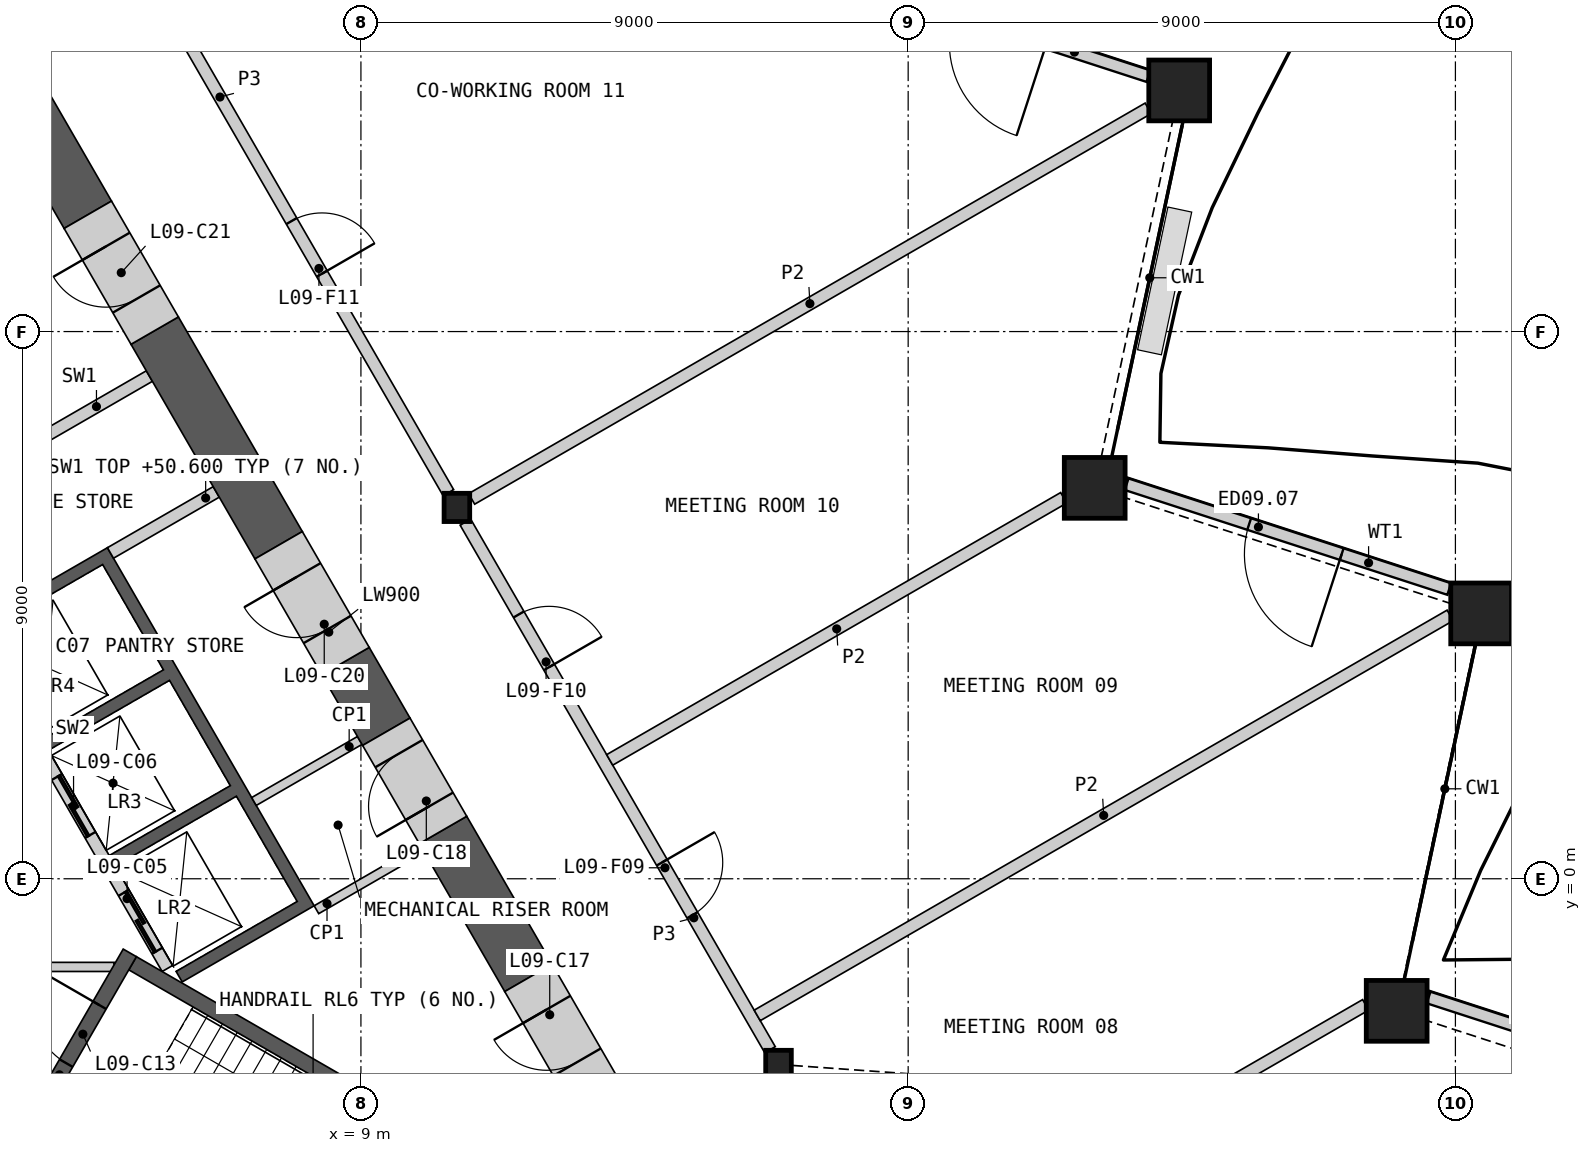
"""IFC4 building model, lengths in metres.
Left out: names, types, materials, properties, quantities, classifications, styles, units other than length and angle.
Written with IfcOpenShell. Run it as: python <this file> out.ifc"""

import sys

from ifc_helpers import new_model, si_unit, direction, frame, frame_2d, origin, origin_2d, place, context, subcontext, project, spatial, polyline, rectangle, hollow_rectangle, i_section, outline, extrude, element, fill, save


model = new_model("IFC4")
c1 = context("Model", 3, precision=1e-05, world=origin(), true_north=direction((0.0, 1.0)))
c2 = subcontext(c1, "Body", "Model", "MODEL_VIEW")
j1 = project(units=[si_unit("LENGTHUNIT", "METRE"), si_unit("PLANEANGLEUNIT", "RADIAN")], contexts=[c1])
p1 = place(None, origin())
s1 = spatial("IfcSite", under=j1, at=p1, CompositionType="ELEMENT")
p2 = place(p1, origin())
s2 = spatial("IfcBuilding", under=s1, at=p2, CompositionType="ELEMENT")
p3 = place(p2, frame((0.0, 0.0, 46.8)))
s3 = spatial("IfcBuildingStorey", under=s2, at=p3, CompositionType="ELEMENT", Elevation=46.8)
for number, where, z_axis, x_axis in (
    (1, (26.034, -2.172, 0.0), (0.0, 0.0, 1.0), (1.0, 0.0, 0.0)),
    (2, (27.423, 4.364, 0.0), (0.0, 0.0, 1.0), (1.0, 0.0, 0.0)),
    (3, (21.068, 6.429, 0.0), (0.0, 0.0, 1.0), (1.0, 0.0, 0.0)),
    (4, (22.457, 12.966, 0.0), (0.0, 0.0, 1.0), (1.0, 0.0, 0.0)),
):
    element("IfcColumn", number, at=place(p3, frame(where, z_axis=z_axis, x_axis=x_axis)), inside=s3, PredefinedType="COLUMN", context=c2, shape_type="SweptSolid", body=[
        extrude(hollow_rectangle(XDim=1.0, YDim=1.0, WallThickness=0.07, at=origin_2d()), origin(), (0.0, 0.0, 1.0), 4.2),
    ])
for number, where, z_axis, x_axis in (
    (5, (15.868, -3.054, 0.0), (0.0, 0.0, 1.0), (1.0, 0.0, 0.0)),
    (6, (10.578, 6.107, 0.0), (0.0, 0.0, 1.0), (1.0, 0.0, 0.0)),
):
    element("IfcColumn", number, at=place(p3, frame(where, z_axis=z_axis, x_axis=x_axis)), inside=s3, PredefinedType="COLUMN", context=c2, shape_type="SweptSolid", body=[
        extrude(i_section(OverallWidth=0.421, OverallDepth=0.465, WebThickness=0.045, FlangeThickness=0.072, at=origin_2d()), origin(), (0.0, 0.0, 1.0), 4.2),
    ])
p4 = place(p3, frame((31.914, -3.693, 0.0), z_axis=(0.0, 0.0, 1.0), x_axis=(-0.951049360908, 0.309039015525, 0.0)))
e7 = element("IfcWall", 7, at=p4, inside=s3, PredefinedType="SOLIDWALL", context=c2, shape_type="SweptSolid", body=[
    extrude(rectangle(XDim=5.631, YDim=0.2, at=frame_2d((2.815, 0.0))), origin(), (0.0, 0.0, 1.0), 3.189),
])
p5 = place(p4, frame((2.031, 0.0, 0.0)))
e8 = element("IfcOpeningElement", 8, at=p5, cuts=e7, PredefinedType="OPENING", context=c2, shape_type="SweptSolid", body=[
    extrude(rectangle(XDim=1.6, YDim=2.4, at=frame_2d((0.8, 1.2))), frame((0.0, 0.11, 0.0), z_axis=(0.0, -1.0, 0.0), x_axis=(1.0, 0.0, 0.0)), (0.0, 0.0, 1.0), 0.22),
])
p6 = place(p3, frame((26.899, 4.765, 0.0), z_axis=(0.0, 0.0, 1.0), x_axis=(-0.951054004345, 0.309024725255, 0.0)))
e9 = element("IfcWall", 9, at=p6, inside=s3, PredefinedType="SOLIDWALL", context=c2, shape_type="SweptSolid", body=[
    extrude(rectangle(XDim=5.579, YDim=0.2, at=frame_2d((2.79, 0.0))), origin(), (0.0, 0.0, 1.0), 3.189),
])
p7 = place(p6, frame((1.86, 0.0, 0.0)))
e10 = element("IfcOpeningElement", 10, at=p7, cuts=e9, PredefinedType="OPENING", context=c2, shape_type="SweptSolid", body=[
    extrude(rectangle(XDim=1.6, YDim=2.4, at=frame_2d((0.8, 1.2))), frame((0.0, 0.11, 0.0), z_axis=(0.0, -1.0, 0.0), x_axis=(1.0, 0.0, 0.0)), (0.0, 0.0, 1.0), 0.22),
])
p8 = place(p3, frame((21.953, 13.2, 0.0), z_axis=(0.0, 0.0, 1.0), x_axis=(-0.951052624268, 0.309028972547, 0.0)))
e11 = element("IfcWall", 11, at=p8, inside=s3, PredefinedType="SOLIDWALL", context=c2, shape_type="SweptSolid", body=[
    extrude(rectangle(XDim=5.124, YDim=0.2, at=frame_2d((2.562, 0.0))), origin(), (0.0, 0.0, 1.0), 3.189),
])
p9 = place(p8, frame((1.762, 0.0, 0.0)))
e12 = element("IfcOpeningElement", 12, at=p9, cuts=e11, PredefinedType="OPENING", context=c2, shape_type="SweptSolid", body=[
    extrude(rectangle(XDim=1.6, YDim=2.4, at=frame_2d((0.8, 1.2))), frame((0.0, 0.11, 0.0), z_axis=(0.0, -1.0, 0.0), x_axis=(1.0, 0.0, 0.0)), (0.0, 0.0, 1.0), 0.22),
])
p10 = place(p3, origin())
e13 = element("IfcWall", 13, at=p10, inside=s3, PredefinedType="SHEAR", context=c2, shape_type="SweptSolid", body=[
    extrude(outline(polyline([(2.66, 4.192), (4.831, 5.445), (8.231, -0.444), (6.061, -1.697), (5.96, -1.524), (7.952, -0.374), (6.952, 1.358), (4.96, 0.208), (4.861, 0.381), (6.852, 1.531), (5.852, 3.263), (3.861, 2.113), (3.76, 2.287), (5.752, 3.437), (4.752, 5.169), (2.76, 4.019), (2.66, 4.192)])), origin(), (0.0, 0.0, 1.0), 3.8),
])
p11 = place(p3, frame((5.817, -1.476, 0.0), z_axis=(0.0, 0.0, 1.0), x_axis=(-0.500002616675, 0.866023893041, 0.0)))
e14 = element("IfcWall", 14, at=p11, inside=s3, PredefinedType="SOLIDWALL", context=c2, shape_type="SweptSolid", body=[
    extrude(rectangle(XDim=8.373, YDim=0.2, at=frame_2d((4.187, 0.0))), origin(), (0.0, 0.0, 1.0), 3.8),
])
p12 = place(p11, frame((0.337, 0.0, 0.0)))
e15 = element("IfcOpeningElement", 15, at=p12, cuts=e14, PredefinedType="OPENING", context=c2, shape_type="SweptSolid", body=[
    extrude(rectangle(XDim=1.1, YDim=2.1, at=frame_2d((0.55, 1.05))), frame((0.0, 0.11, 0.0), z_axis=(0.0, -1.0, 0.0), x_axis=(1.0, 0.0, 0.0)), (0.0, 0.0, 1.0), 0.22),
])
p13 = place(p11, frame((2.537, 0.0, 0.0)))
e16 = element("IfcOpeningElement", 16, at=p13, cuts=e14, PredefinedType="OPENING", context=c2, shape_type="SweptSolid", body=[
    extrude(rectangle(XDim=1.1, YDim=2.1, at=frame_2d((0.55, 1.05))), frame((0.0, 0.11, 0.0), z_axis=(0.0, -1.0, 0.0), x_axis=(1.0, 0.0, 0.0)), (0.0, 0.0, 1.0), 0.22),
])
p14 = place(p11, frame((4.737, 0.0, 0.0)))
e17 = element("IfcOpeningElement", 17, at=p14, cuts=e14, PredefinedType="OPENING", context=c2, shape_type="SweptSolid", body=[
    extrude(rectangle(XDim=1.1, YDim=2.1, at=frame_2d((0.55, 1.05))), frame((0.0, 0.11, 0.0), z_axis=(0.0, -1.0, 0.0), x_axis=(1.0, 0.0, 0.0)), (0.0, 0.0, 1.0), 0.22),
])
p15 = place(p11, frame((7.037, 0.0, 0.0)))
e18 = element("IfcOpeningElement", 18, at=p15, cuts=e14, PredefinedType="OPENING", context=c2, shape_type="SweptSolid", body=[
    extrude(rectangle(XDim=0.9, YDim=2.1, at=frame_2d((0.45, 1.05))), frame((0.0, 0.11, 0.0), z_axis=(0.0, -1.0, 0.0), x_axis=(1.0, 0.0, 0.0)), (0.0, 0.0, 1.0), 0.22),
])
p16 = place(p3, frame((4.881, 5.358, 0.0), z_axis=(0.0, 0.0, 1.0), x_axis=(0.866035824272, 0.499981950752, 0.0)))
e19 = element("IfcWall", 19, at=p16, inside=s3, PredefinedType="SHEAR", context=c2, shape_type="SweptSolid", body=[
    extrude(rectangle(XDim=2.009, YDim=0.2, at=frame_2d((1.004, 0.0))), origin(), (0.0, 0.0, 1.0), 3.8),
])
p17 = place(p3, frame((3.781, 7.263, 0.0), z_axis=(0.0, 0.0, 1.0), x_axis=(0.865983199114, 0.50007309351, 0.0)))
e20 = element("IfcWall", 20, at=p17, inside=s3, PredefinedType="SHEAR", context=c2, shape_type="SweptSolid", body=[
    extrude(rectangle(XDim=2.009, YDim=0.2, at=frame_2d((1.004, 0.0))), origin(), (0.0, 0.0, 1.0), 3.8),
])
p18 = place(p3, frame((-4.941, -1.45, 0.0), z_axis=(0.0, 0.0, 1.0), x_axis=(1.0, 0.0, 0.0)))
e21 = element("IfcWall", 21, at=p18, inside=s3, PredefinedType="PARTITIONING", context=c2, shape_type="SweptSolid", body=[
    extrude(rectangle(XDim=9.882, YDim=0.15, at=frame_2d((4.941, 0.0))), origin(), (0.0, 0.0, 1.0), 3.8),
])
p19 = place(p18, frame((4.391, 0.0, 0.0)))
e22 = element("IfcOpeningElement", 22, at=p19, cuts=e21, PredefinedType="OPENING", context=c2, shape_type="SweptSolid", body=[
    extrude(rectangle(XDim=1.1, YDim=2.1, at=frame_2d((0.55, 1.05))), frame((0.0, 0.085, 0.0), z_axis=(0.0, -1.0, 0.0), x_axis=(1.0, 0.0, 0.0)), (0.0, 0.0, 1.0), 0.17),
])
p20 = place(p3, origin())
e23 = element("IfcWall", 23, at=p20, inside=s3, PredefinedType="SHEAR", context=c2, shape_type="SweptSolid", body=[
    extrude(outline(polyline([(10.032, -4.298), (10.374, -4.206), (5.307, -1.281), (5.182, -1.498), (10.032, -4.298)])), origin(), (0.0, 0.0, 1.0), 3.8),
])
p21 = place(p3, frame((3.655, -3.893, 0.0), z_axis=(0.0, 0.0, 1.0), x_axis=(0.499982516597, 0.866035497597, 0.0)))
e24 = element("IfcWall", 24, at=p21, inside=s3, PredefinedType="SHEAR", context=c2, shape_type="SweptSolid", body=[
    extrude(rectangle(XDim=3.088, YDim=0.25, at=frame_2d((1.544, 0.0))), origin(), (0.0, 0.0, 1.0), 3.8),
])
p22 = place(p21, frame((0.994, 0.0, 0.0)))
e25 = element("IfcOpeningElement", 25, at=p22, cuts=e24, PredefinedType="OPENING", context=c2, shape_type="SweptSolid", body=[
    extrude(rectangle(XDim=1.1, YDim=2.1, at=frame_2d((0.55, 1.05))), frame((0.0, 0.135, 0.0), z_axis=(0.0, -1.0, 0.0), x_axis=(1.0, 0.0, 0.0)), (0.0, 0.0, 1.0), 0.27),
])
p23 = place(p3, frame((8.268, -0.509, 0.0), z_axis=(0.0, 0.0, 1.0), x_axis=(0.866035824272, 0.499981950752, 0.0)))
e26 = element("IfcWall", 26, at=p23, inside=s3, PredefinedType="PARTITIONING", context=c2, shape_type="SweptSolid", body=[
    extrude(rectangle(XDim=2.009, YDim=0.15, at=frame_2d((1.004, 0.0))), origin(), (0.0, 0.0, 1.0), 3.8),
])
p24 = place(p3, frame((8.981, 2.275, 0.0), z_axis=(0.0, 0.0, 1.0), x_axis=(-0.866013584312, -0.500020471368, 0.0)))
e27 = element("IfcWall", 27, at=p24, inside=s3, PredefinedType="PARTITIONING", context=c2, shape_type="SweptSolid", body=[
    extrude(rectangle(XDim=2.009, YDim=0.15, at=frame_2d((1.005, 0.0))), origin(), (0.0, 0.0, 1.0), 3.8),
])
p25 = place(p3, frame((7.646, 5.486, 0.0), z_axis=(0.0, 0.0, 1.0), x_axis=(-0.499978218965, 0.866037978706, 0.0)))
e28 = element("IfcWall", 28, at=p25, inside=s3, PredefinedType="SHEAR", context=c2, shape_type="SweptSolid", body=[
    extrude(rectangle(XDim=4.076, YDim=0.9, at=frame_2d((2.038, 0.0))), origin(), (0.0, 0.0, 1.0), 3.8),
])
p26 = place(p3, frame((4.509, 10.921, 0.0), z_axis=(0.0, 0.0, 1.0), x_axis=(-0.49999004381, 0.866031151917, 0.0)))
e29 = element("IfcWall", 29, at=p26, inside=s3, PredefinedType="SHEAR", context=c2, shape_type="SweptSolid", body=[
    extrude(rectangle(XDim=3.975, YDim=0.9, at=frame_2d((1.988, 0.0))), origin(), (0.0, 0.0, 1.0), 3.8),
])
p27 = place(p3, frame((11.755, -1.63, 0.0), z_axis=(0.0, 0.0, 1.0), x_axis=(-0.499943114462, 0.866058244174, 0.0)))
e30 = element("IfcWall", 30, at=p27, inside=s3, PredefinedType="SHEAR", context=c2, shape_type="SweptSolid", body=[
    extrude(rectangle(XDim=2.809, YDim=0.9, at=frame_2d((1.405, 0.0))), origin(), (0.0, 0.0, 1.0), 3.8),
])
p28 = place(p3, frame((9.418, 2.418, 0.0), z_axis=(0.0, 0.0, 1.0), x_axis=(-0.49995335277, 0.8660523339, 0.0)))
e31 = element("IfcWall", 31, at=p28, inside=s3, PredefinedType="SHEAR", context=c2, shape_type="SweptSolid", body=[
    extrude(rectangle(XDim=1.343, YDim=0.9, at=frame_2d((0.671, 0.0))), origin(), (0.0, 0.0, 1.0), 3.8),
])
p29 = place(p3, frame((12.855, -3.536, 0.0), z_axis=(0.0, 0.0, 1.0), x_axis=(-0.50002983664, 0.866008176907, 0.0)))
e32 = element("IfcWall", 32, at=p29, inside=s3, PredefinedType="SHEAR", context=c2, shape_type="SweptSolid", body=[
    extrude(rectangle(XDim=2.2, YDim=0.9, at=frame_2d((1.1, 0.0))), origin(), (0.0, 0.0, 1.0), 3.8),
])
p30 = place(p29, frame((0.6, 0.0, 0.0)))
e33 = element("IfcOpeningElement", 33, at=p30, cuts=e32, PredefinedType="OPENING", context=c2, shape_type="SweptSolid", body=[
    extrude(rectangle(XDim=1.0, YDim=2.1, at=frame_2d((0.5, 1.05))), frame((0.0, 0.46, 0.0), z_axis=(0.0, -1.0, 0.0), x_axis=(1.0, 0.0, 0.0)), (0.0, 0.0, 1.0), 0.92),
])
p31 = place(p3, frame((10.35, 0.803, 0.0), z_axis=(0.0, 0.0, 1.0), x_axis=(-0.500081290722, 0.865978465477, 0.0)))
e34 = element("IfcWall", 34, at=p31, inside=s3, PredefinedType="SHEAR", context=c2, shape_type="SweptSolid", body=[
    extrude(rectangle(XDim=1.865, YDim=0.9, at=frame_2d((0.933, 0.0))), origin(), (0.0, 0.0, 1.0), 3.8),
])
p32 = place(p31, frame((0.45, 0.0, 0.0)))
e35 = element("IfcOpeningElement", 35, at=p32, cuts=e34, PredefinedType="OPENING", context=c2, shape_type="SweptSolid", body=[
    extrude(rectangle(XDim=1.0, YDim=2.1, at=frame_2d((0.5, 1.05))), frame((0.0, 0.46, 0.0), z_axis=(0.0, -1.0, 0.0), x_axis=(1.0, 0.0, 0.0)), (0.0, 0.0, 1.0), 0.92),
])
p33 = place(p3, frame((8.747, 3.58, 0.0), z_axis=(0.0, 0.0, 1.0), x_axis=(-0.50002983664, 0.866008176907, 0.0)))
e36 = element("IfcWall", 36, at=p33, inside=s3, PredefinedType="SHEAR", context=c2, shape_type="SweptSolid", body=[
    extrude(rectangle(XDim=2.2, YDim=0.9, at=frame_2d((1.1, 0.0))), origin(), (0.0, 0.0, 1.0), 3.8),
])
p34 = place(p33, frame((0.6, 0.0, 0.0)))
e37 = element("IfcOpeningElement", 37, at=p34, cuts=e36, PredefinedType="OPENING", context=c2, shape_type="SweptSolid", body=[
    extrude(rectangle(XDim=1.0, YDim=2.1, at=frame_2d((0.5, 1.05))), frame((0.0, 0.46, 0.0), z_axis=(0.0, -1.0, 0.0), x_axis=(1.0, 0.0, 0.0)), (0.0, 0.0, 1.0), 0.92),
])
p35 = place(p3, frame((5.608, 9.016, 0.0), z_axis=(0.0, 0.0, 1.0), x_axis=(-0.499994660107, 0.866028486751, 0.0)))
e38 = element("IfcWall", 38, at=p35, inside=s3, PredefinedType="SHEAR", context=c2, shape_type="SweptSolid", body=[
    extrude(rectangle(XDim=2.2, YDim=0.9, at=frame_2d((1.1, 0.0))), origin(), (0.0, 0.0, 1.0), 3.8),
])
p36 = place(p35, frame((0.6, 0.0, 0.0)))
e39 = element("IfcOpeningElement", 39, at=p36, cuts=e38, PredefinedType="OPENING", context=c2, shape_type="SweptSolid", body=[
    extrude(rectangle(XDim=1.0, YDim=2.1, at=frame_2d((0.5, 1.05))), frame((0.0, 0.46, 0.0), z_axis=(0.0, -1.0, 0.0), x_axis=(1.0, 0.0, 0.0)), (0.0, 0.0, 1.0), 0.92),
])
p37 = place(p3, frame((10.719, 5.865, 0.0), z_axis=(0.0, 0.0, 1.0), x_axis=(0.49999175339, -0.866030164915, 0.0)))
e40 = element("IfcWall", 40, at=p37, inside=s3, PredefinedType="PARTITIONING", context=c2, shape_type="SweptSolid", body=[
    extrude(rectangle(XDim=10.019, YDim=0.2, at=frame_2d((5.009, 0.0))), origin(), (0.0, 0.0, 1.0), 3.8),
])
p38 = place(p37, frame((6.464, 0.0, 0.0)))
e41 = element("IfcOpeningElement", 41, at=p38, cuts=e40, PredefinedType="OPENING", context=c2, shape_type="SweptSolid", body=[
    extrude(rectangle(XDim=1.0, YDim=2.1, at=frame_2d((0.5, 1.05))), frame((0.0, 0.11, 0.0), z_axis=(0.0, -1.0, 0.0), x_axis=(1.0, 0.0, 0.0)), (0.0, 0.0, 1.0), 0.22),
])
p39 = place(p37, frame((1.753, 0.0, 0.0)))
e42 = element("IfcOpeningElement", 42, at=p39, cuts=e40, PredefinedType="OPENING", context=c2, shape_type="SweptSolid", body=[
    extrude(rectangle(XDim=1.0, YDim=2.1, at=frame_2d((0.5, 1.05))), frame((0.0, 0.11, 0.0), z_axis=(0.0, -1.0, 0.0), x_axis=(1.0, 0.0, 0.0)), (0.0, 0.0, 1.0), 0.22),
])
p40 = place(p3, frame((5.429, 15.026, 0.0), z_axis=(0.0, 0.0, 1.0), x_axis=(0.50001002959, -0.86601961312, 0.0)))
e43 = element("IfcWall", 43, at=p40, inside=s3, PredefinedType="PARTITIONING", context=c2, shape_type="SweptSolid", body=[
    extrude(rectangle(XDim=10.019, YDim=0.2, at=frame_2d((5.009, 0.0))), origin(), (0.0, 0.0, 1.0), 3.8),
])
p41 = place(p40, frame((4.86, 0.0, 0.0)))
e44 = element("IfcOpeningElement", 44, at=p41, cuts=e43, PredefinedType="OPENING", context=c2, shape_type="SweptSolid", body=[
    extrude(rectangle(XDim=1.0, YDim=2.1, at=frame_2d((0.5, 1.05))), frame((0.0, 0.11, 0.0), z_axis=(0.0, -1.0, 0.0), x_axis=(1.0, 0.0, 0.0)), (0.0, 0.0, 1.0), 0.22),
])
p42 = place(p3, frame((15.518, -2.248, 0.0), z_axis=(0.0, 0.0, 1.0), x_axis=(0.866025231175, 0.500000298968, 0.0)))
e45 = element("IfcWall", 45, at=p42, inside=s3, PredefinedType="PARTITIONING", context=c2, shape_type="SweptSolid", body=[
    extrude(rectangle(XDim=13.159, YDim=0.2, at=frame_2d((6.579, 0.0))), origin(), (0.0, 0.0, 1.0), 2.885),
])
p43 = place(p3, frame((10.821, 6.247, 0.0), z_axis=(0.0, 0.0, 1.0), x_axis=(0.866026729935, 0.499997703033, 0.0)))
e46 = element("IfcWall", 46, at=p43, inside=s3, PredefinedType="PARTITIONING", context=c2, shape_type="SweptSolid", body=[
    extrude(rectangle(XDim=12.848, YDim=0.2, at=frame_2d((6.424, 0.0))), origin(), (0.0, 0.0, 1.0), 2.885),
])
p44 = place(p3, frame((17.944, -6.45, 0.0), z_axis=(0.0, 0.0, 1.0), x_axis=(0.866025328989, 0.50000012955, 0.0)))
e47 = element("IfcWall", 47, at=p44, inside=s3, PredefinedType="PARTITIONING", context=c2, shape_type="SweptSolid", body=[
    extrude(rectangle(XDim=8.752, YDim=0.2, at=frame_2d((4.376, 0.0))), origin(), (0.0, 0.0, 1.0), 2.885),
])
p45 = place(p3, frame((13.091, 1.955, 0.0), z_axis=(0.0, 0.0, 1.0), x_axis=(0.866026670206, 0.499997806488, 0.0)))
e48 = element("IfcWall", 48, at=p45, inside=s3, PredefinedType="PARTITIONING", context=c2, shape_type="SweptSolid", body=[
    extrude(rectangle(XDim=8.622, YDim=0.2, at=frame_2d((4.311, 0.0))), origin(), (0.0, 0.0, 1.0), 2.885),
])
p46 = place(p7, origin())
e49 = element("IfcDoor", 49, at=p46, inside=s3, OperationType="DOUBLE_DOOR_SINGLE_SWING", PredefinedType="DOOR", context=c2, shape_type="SweptSolid", body=[
    extrude(rectangle(XDim=1.6, YDim=2.4, at=frame_2d((0.8, 1.2))), frame((0.0, 0.025, 0.0), z_axis=(0.0, -1.0, 0.0), x_axis=(1.0, 0.0, 0.0)), (0.0, 0.0, 1.0), 0.05),
])
fill(e10, e49)
p47 = place(p12, origin())
e50 = element("IfcDoor", 50, at=p47, inside=s3, OperationType="SLIDING_TO_LEFT", PredefinedType="DOOR", context=c2, shape_type="SweptSolid", body=[
    extrude(rectangle(XDim=1.1, YDim=2.1, at=frame_2d((0.55, 1.05))), frame((0.0, 0.025, 0.0), z_axis=(0.0, -1.0, 0.0), x_axis=(1.0, 0.0, 0.0)), (0.0, 0.0, 1.0), 0.05),
])
fill(e15, e50)
p48 = place(p13, origin())
e51 = element("IfcDoor", 51, at=p48, inside=s3, OperationType="SLIDING_TO_LEFT", PredefinedType="DOOR", context=c2, shape_type="SweptSolid", body=[
    extrude(rectangle(XDim=1.1, YDim=2.1, at=frame_2d((0.55, 1.05))), frame((0.0, 0.025, 0.0), z_axis=(0.0, -1.0, 0.0), x_axis=(1.0, 0.0, 0.0)), (0.0, 0.0, 1.0), 0.05),
])
fill(e16, e51)
p49 = place(p22, origin())
e52 = element("IfcDoor", 52, at=p49, inside=s3, OperationType="SINGLE_SWING_RIGHT", PredefinedType="DOOR", context=c2, shape_type="SweptSolid", body=[
    extrude(rectangle(XDim=1.1, YDim=2.1, at=frame_2d((0.55, 1.05))), frame((0.0, 0.025, 0.0), z_axis=(0.0, -1.0, 0.0), x_axis=(1.0, 0.0, 0.0)), (0.0, 0.0, 1.0), 0.05),
])
fill(e25, e52)
p50 = place(p30, origin())
e53 = element("IfcDoor", 53, at=p50, inside=s3, OperationType="SINGLE_SWING_RIGHT", PredefinedType="DOOR", context=c2, shape_type="SweptSolid", body=[
    extrude(rectangle(XDim=1.0, YDim=2.1, at=frame_2d((0.5, 1.05))), frame((0.0, 0.205, 0.0), z_axis=(0.0, -1.0, 0.0), x_axis=(1.0, 0.0, 0.0)), (0.0, 0.0, 1.0), 0.05),
])
fill(e33, e53)
p51 = place(p32, origin())
e54 = element("IfcDoor", 54, at=p51, inside=s3, OperationType="SINGLE_SWING_LEFT", PredefinedType="DOOR", context=c2, shape_type="SweptSolid", body=[
    extrude(rectangle(XDim=1.0, YDim=2.1, at=frame_2d((0.5, 1.05))), frame((0.0, 0.205, 0.0), z_axis=(0.0, -1.0, 0.0), x_axis=(1.0, 0.0, 0.0)), (0.0, 0.0, 1.0), 0.05),
])
fill(e35, e54)
p52 = place(p34, origin())
e55 = element("IfcDoor", 55, at=p52, inside=s3, OperationType="SINGLE_SWING_RIGHT", PredefinedType="DOOR", context=c2, shape_type="SweptSolid", body=[
    extrude(rectangle(XDim=1.0, YDim=2.1, at=frame_2d((0.5, 1.05))), frame((0.0, 0.205, 0.0), z_axis=(0.0, -1.0, 0.0), x_axis=(1.0, 0.0, 0.0)), (0.0, 0.0, 1.0), 0.05),
])
fill(e37, e55)
p53 = place(p36, origin())
e56 = element("IfcDoor", 56, at=p53, inside=s3, OperationType="SINGLE_SWING_RIGHT", PredefinedType="DOOR", context=c2, shape_type="SweptSolid", body=[
    extrude(rectangle(XDim=1.0, YDim=2.1, at=frame_2d((0.5, 1.05))), frame((0.0, 0.205, 0.0), z_axis=(0.0, -1.0, 0.0), x_axis=(1.0, 0.0, 0.0)), (0.0, 0.0, 1.0), 0.05),
])
fill(e39, e56)
p54 = place(p38, origin())
e57 = element("IfcDoor", 57, at=p54, inside=s3, OperationType="SINGLE_SWING_LEFT", PredefinedType="DOOR", context=c2, shape_type="SweptSolid", body=[
    extrude(rectangle(XDim=1.0, YDim=2.1, at=frame_2d((0.5, 1.05))), frame((0.0, 0.025, 0.0), z_axis=(0.0, -1.0, 0.0), x_axis=(1.0, 0.0, 0.0)), (0.0, 0.0, 1.0), 0.05),
])
fill(e41, e57)
p55 = place(p39, origin())
e58 = element("IfcDoor", 58, at=p55, inside=s3, OperationType="SINGLE_SWING_RIGHT", PredefinedType="DOOR", context=c2, shape_type="SweptSolid", body=[
    extrude(rectangle(XDim=1.0, YDim=2.1, at=frame_2d((0.5, 1.05))), frame((0.0, 0.025, 0.0), z_axis=(0.0, -1.0, 0.0), x_axis=(1.0, 0.0, 0.0)), (0.0, 0.0, 1.0), 0.05),
])
fill(e42, e58)
p56 = place(p41, origin())
e59 = element("IfcDoor", 59, at=p56, inside=s3, OperationType="SINGLE_SWING_RIGHT", PredefinedType="DOOR", context=c2, shape_type="SweptSolid", body=[
    extrude(rectangle(XDim=1.0, YDim=2.1, at=frame_2d((0.5, 1.05))), frame((0.0, 0.025, 0.0), z_axis=(0.0, -1.0, 0.0), x_axis=(1.0, 0.0, 0.0)), (0.0, 0.0, 1.0), 0.05),
])
fill(e44, e59)
save(model, sys.argv[1])
